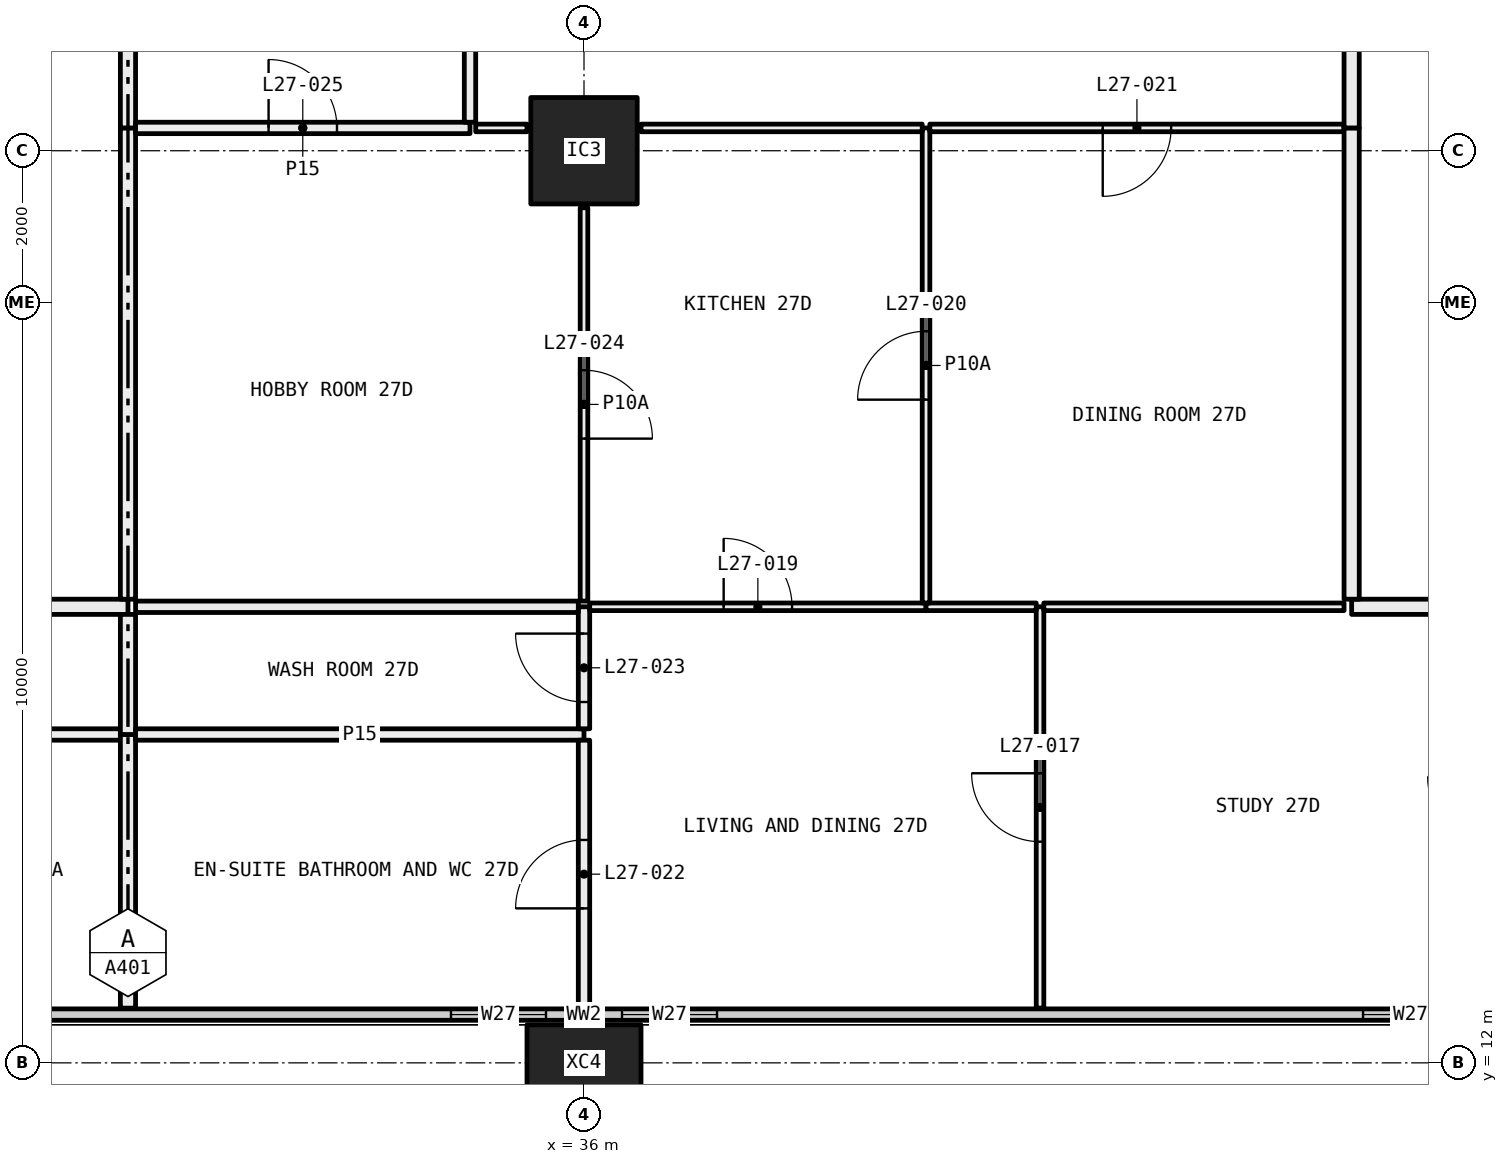
"""IFC4 building model, lengths in metres.
Left out: names, types, materials, properties, quantities, classifications, styles, units other than length and angle.
Written with IfcOpenShell. Run it as: python <this file> out.ifc"""

import sys

from ifc_helpers import new_model, si_unit, direction, frame, frame_2d, origin, origin_2d, place, context, subcontext, project, spatial, rectangle, hollow_rectangle, extrude, element, fill, save


model = new_model("IFC4")
c1 = context("Model", 3, precision=1e-05, world=origin(), true_north=direction((0.0, 1.0)))
c2 = subcontext(c1, "Body", "Model", "MODEL_VIEW")
j1 = project(units=[si_unit("LENGTHUNIT", "METRE"), si_unit("PLANEANGLEUNIT", "RADIAN")], contexts=[c1])
p1 = place(None, origin())
s1 = spatial("IfcSite", under=j1, at=p1, CompositionType="ELEMENT")
p2 = place(p1, origin())
s2 = spatial("IfcBuilding", under=s1, at=p2, CompositionType="ELEMENT")
p3 = place(p2, frame((0.0, 0.0, 106.95)))
s3 = spatial("IfcBuildingStorey", under=s2, at=p3, CompositionType="ELEMENT", Elevation=106.95)
p4 = place(p3, frame((36.0, 12.0, -0.4), z_axis=(0.0, 0.0, 1.0), x_axis=(1.0, 0.0, 0.0)))
e1 = element("IfcColumn", 1, at=p4, inside=s3, PredefinedType="COLUMN", context=c2, shape_type="SweptSolid", body=[
    extrude(hollow_rectangle(XDim=1.5, YDim=1.0, WallThickness=0.06, at=origin_2d()), origin(), (0.0, 0.0, 1.0), 3.45),
])
p5 = place(p3, frame((36.0, 24.0, 0.0), z_axis=(0.0, 0.0, 1.0), x_axis=(1.0, 0.0, 0.0)))
e2 = element("IfcColumn", 2, at=p5, inside=s3, PredefinedType="COLUMN", context=c2, shape_type="SweptSolid", body=[
    extrude(hollow_rectangle(XDim=1.4, YDim=1.4, WallThickness=0.06, at=origin_2d()), origin(), (0.0, 0.0, 1.0), 3.05),
])
p6 = place(p3, frame((6.56, 12.635, 0.0), z_axis=(0.0, 0.0, 1.0), x_axis=(1.0, 0.0, 0.0)))
e3 = element("IfcWall", 3, at=p6, inside=s3, PredefinedType="ELEMENTEDWALL", context=c2, shape_type="SweptSolid", body=[
    extrude(rectangle(XDim=58.88, YDim=0.15, at=frame_2d((29.44, 0.0))), origin(), (0.0, 0.0, 1.0), 3.05),
])
p7 = place(p6, frame((0.44, 0.0, 0.45)))
e4 = element("IfcOpeningElement", 4, at=p7, cuts=e3, PredefinedType="OPENING", context=c2, shape_type="SweptSolid", body=[
    extrude(rectangle(XDim=4.5, YDim=2.55, at=frame_2d((2.25, 1.275))), frame((0.0, 0.085, 0.0), z_axis=(0.0, -1.0, 0.0), x_axis=(1.0, 0.0, 0.0)), (0.0, 0.0, 1.0), 0.17),
])
p8 = place(p6, frame((5.94, 0.0, 0.45)))
e5 = element("IfcOpeningElement", 5, at=p8, cuts=e3, PredefinedType="OPENING", context=c2, shape_type="SweptSolid", body=[
    extrude(rectangle(XDim=1.25, YDim=2.55, at=frame_2d((0.625, 1.275))), frame((0.0, 0.085, 0.0), z_axis=(0.0, -1.0, 0.0), x_axis=(1.0, 0.0, 0.0)), (0.0, 0.0, 1.0), 0.17),
])
p9 = place(p6, frame((15.69, 0.0, 0.45)))
e6 = element("IfcOpeningElement", 6, at=p9, cuts=e3, PredefinedType="OPENING", context=c2, shape_type="SweptSolid", body=[
    extrude(rectangle(XDim=1.25, YDim=2.55, at=frame_2d((0.625, 1.275))), frame((0.0, 0.085, 0.0), z_axis=(0.0, -1.0, 0.0), x_axis=(1.0, 0.0, 0.0)), (0.0, 0.0, 1.0), 0.17),
])
p10 = place(p6, frame((17.94, 0.0, 0.45)))
e7 = element("IfcOpeningElement", 7, at=p10, cuts=e3, PredefinedType="OPENING", context=c2, shape_type="SweptSolid", body=[
    extrude(rectangle(XDim=1.25, YDim=2.55, at=frame_2d((0.625, 1.275))), frame((0.0, 0.085, 0.0), z_axis=(0.0, -1.0, 0.0), x_axis=(1.0, 0.0, 0.0)), (0.0, 0.0, 1.0), 0.17),
])
p11 = place(p6, frame((27.69, 0.0, 0.45)))
e8 = element("IfcOpeningElement", 8, at=p11, cuts=e3, PredefinedType="OPENING", context=c2, shape_type="SweptSolid", body=[
    extrude(rectangle(XDim=1.25, YDim=2.55, at=frame_2d((0.625, 1.275))), frame((0.0, 0.085, 0.0), z_axis=(0.0, -1.0, 0.0), x_axis=(1.0, 0.0, 0.0)), (0.0, 0.0, 1.0), 0.17),
])
p12 = place(p6, frame((29.94, 0.0, 0.45)))
e9 = element("IfcOpeningElement", 9, at=p12, cuts=e3, PredefinedType="OPENING", context=c2, shape_type="SweptSolid", body=[
    extrude(rectangle(XDim=1.25, YDim=2.55, at=frame_2d((0.625, 1.275))), frame((0.0, 0.085, 0.0), z_axis=(0.0, -1.0, 0.0), x_axis=(1.0, 0.0, 0.0)), (0.0, 0.0, 1.0), 0.17),
])
p13 = place(p6, frame((39.69, 0.0, 0.45)))
e10 = element("IfcOpeningElement", 10, at=p13, cuts=e3, PredefinedType="OPENING", context=c2, shape_type="SweptSolid", body=[
    extrude(rectangle(XDim=1.25, YDim=2.55, at=frame_2d((0.625, 1.275))), frame((0.0, 0.085, 0.0), z_axis=(0.0, -1.0, 0.0), x_axis=(1.0, 0.0, 0.0)), (0.0, 0.0, 1.0), 0.17),
])
p14 = place(p6, frame((41.94, 0.0, 0.45)))
e11 = element("IfcOpeningElement", 11, at=p14, cuts=e3, PredefinedType="OPENING", context=c2, shape_type="SweptSolid", body=[
    extrude(rectangle(XDim=1.25, YDim=2.55, at=frame_2d((0.625, 1.275))), frame((0.0, 0.085, 0.0), z_axis=(0.0, -1.0, 0.0), x_axis=(1.0, 0.0, 0.0)), (0.0, 0.0, 1.0), 0.17),
])
p15 = place(p6, frame((51.69, 0.0, 0.45)))
e12 = element("IfcOpeningElement", 12, at=p15, cuts=e3, PredefinedType="OPENING", context=c2, shape_type="SweptSolid", body=[
    extrude(rectangle(XDim=1.25, YDim=2.55, at=frame_2d((0.625, 1.275))), frame((0.0, 0.085, 0.0), z_axis=(0.0, -1.0, 0.0), x_axis=(1.0, 0.0, 0.0)), (0.0, 0.0, 1.0), 0.17),
])
p16 = place(p6, frame((53.94, 0.0, 0.45)))
e13 = element("IfcOpeningElement", 13, at=p16, cuts=e3, PredefinedType="OPENING", context=c2, shape_type="SweptSolid", body=[
    extrude(rectangle(XDim=4.5, YDim=2.55, at=frame_2d((2.25, 1.275))), frame((0.0, 0.085, 0.0), z_axis=(0.0, -1.0, 0.0), x_axis=(1.0, 0.0, 0.0)), (0.0, 0.0, 1.0), 0.17),
])
p17 = place(p3, frame((29.9, 16.32, 0.0), z_axis=(0.0, 0.0, 1.0), x_axis=(-1.0, 0.0, 0.0)))
e14 = element("IfcWall", 14, at=p17, inside=s3, PredefinedType="PARTITIONING", context=c2, shape_type="SweptSolid", body=[
    extrude(rectangle(XDim=5.825, YDim=0.15, at=frame_2d((2.913, 0.0))), origin(), (0.0, 0.0, 1.0), 3.05),
])
p18 = place(p3, frame((30.0, 12.72, 0.0), z_axis=(0.0, 0.0, 1.0), x_axis=(0.0, 1.0, 0.0)))
e15 = element("IfcWall", 15, at=p18, inside=s3, PredefinedType="PARTITIONING", context=c2, shape_type="SweptSolid", body=[
    extrude(rectangle(XDim=3.6, YDim=0.2, at=frame_2d((1.8, 0.0))), origin(), (0.0, 0.0, 1.0), 3.05),
])
p19 = place(p3, frame((30.0, 18.0, 0.0), z_axis=(0.0, 0.0, 1.0), x_axis=(-1.0, 0.0, 0.0)))
e16 = element("IfcWall", 16, at=p19, inside=s3, PredefinedType="PARTITIONING", context=c2, shape_type="SweptSolid", body=[
    extrude(rectangle(XDim=4.1, YDim=0.2, at=frame_2d((2.05, 0.0))), origin(), (0.0, 0.0, 1.0), 3.05),
])
p20 = place(p3, frame((30.0, 16.32, 0.0), z_axis=(0.0, 0.0, 1.0), x_axis=(0.0, 1.0, 0.0)))
e17 = element("IfcWall", 17, at=p20, inside=s3, PredefinedType="PARTITIONING", context=c2, shape_type="SweptSolid", body=[
    extrude(rectangle(XDim=1.58, YDim=0.2, at=frame_2d((0.79, 0.0))), origin(), (0.0, 0.0, 1.0), 3.05),
])
p21 = place(p3, frame((30.0, 18.1, 0.0), z_axis=(0.0, 0.0, 1.0), x_axis=(0.0, 1.0, 0.0)))
e18 = element("IfcWall", 18, at=p21, inside=s3, PredefinedType="PARTITIONING", context=c2, shape_type="SweptSolid", body=[
    extrude(rectangle(XDim=6.2, YDim=0.2, at=frame_2d((3.1, 0.0))), origin(), (0.0, 0.0, 1.0), 2.45),
])
p22 = place(p3, frame((30.0, 24.3, 0.0), z_axis=(0.0, 0.0, 1.0), x_axis=(0.0, 1.0, 0.0)))
e19 = element("IfcWall", 19, at=p22, inside=s3, PredefinedType="PARTITIONING", context=c2, shape_type="SweptSolid", body=[
    extrude(rectangle(XDim=4.5, YDim=0.2, at=frame_2d((2.25, 0.0))), origin(), (0.0, 0.0, 1.0), 3.05),
])
p23 = place(p3, frame((36.0, 16.32, 0.0), z_axis=(0.0, 0.0, 1.0), x_axis=(-1.0, 0.0, 0.0)))
e20 = element("IfcWall", 20, at=p23, inside=s3, PredefinedType="PARTITIONING", context=c2, shape_type="SweptSolid", body=[
    extrude(rectangle(XDim=5.9, YDim=0.15, at=frame_2d((2.95, 0.0))), origin(), (0.0, 0.0, 1.0), 2.45),
])
p24 = place(p3, frame((36.0, 12.72, 0.0), z_axis=(0.0, 0.0, 1.0), x_axis=(0.0, 1.0, 0.0)))
e21 = element("IfcWall", 21, at=p24, inside=s3, PredefinedType="PARTITIONING", context=c2, shape_type="SweptSolid", body=[
    extrude(rectangle(XDim=3.525, YDim=0.15, at=frame_2d((1.763, 0.0))), origin(), (0.0, 0.0, 1.0), 2.45),
])
p25 = place(p24, frame((1.312, 0.0, 0.0)))
e22 = element("IfcOpeningElement", 22, at=p25, cuts=e21, PredefinedType="OPENING", context=c2, shape_type="SweptSolid", body=[
    extrude(rectangle(XDim=0.9, YDim=2.1, at=frame_2d((0.45, 1.05))), frame((0.0, 0.085, 0.0), z_axis=(0.0, -1.0, 0.0), x_axis=(1.0, 0.0, 0.0)), (0.0, 0.0, 1.0), 0.17),
])
p26 = place(p3, frame((36.0, 16.395, 0.0), z_axis=(0.0, 0.0, 1.0), x_axis=(0.0, 1.0, 0.0)))
e23 = element("IfcWall", 23, at=p26, inside=s3, PredefinedType="PARTITIONING", context=c2, shape_type="SweptSolid", body=[
    extrude(rectangle(XDim=1.605, YDim=0.15, at=frame_2d((0.802, 0.0))), origin(), (0.0, 0.0, 1.0), 2.45),
])
p27 = place(p26, frame((0.353, 0.0, 0.0)))
e24 = element("IfcOpeningElement", 24, at=p27, cuts=e23, PredefinedType="OPENING", context=c2, shape_type="SweptSolid", body=[
    extrude(rectangle(XDim=0.9, YDim=2.1, at=frame_2d((0.45, 1.05))), frame((0.0, 0.085, 0.0), z_axis=(0.0, -1.0, 0.0), x_axis=(1.0, 0.0, 0.0)), (0.0, 0.0, 1.0), 0.17),
])
p28 = place(p3, frame((35.925, 18.0, 0.0), z_axis=(0.0, 0.0, 1.0), x_axis=(-1.0, 0.0, 0.0)))
e25 = element("IfcWall", 25, at=p28, inside=s3, PredefinedType="PARTITIONING", context=c2, shape_type="SweptSolid", body=[
    extrude(rectangle(XDim=5.825, YDim=0.15, at=frame_2d((2.913, 0.0))), origin(), (0.0, 0.0, 1.0), 2.45),
])
p29 = place(p3, frame((42.0, 12.72, 0.0), z_axis=(0.0, 0.0, 1.0), x_axis=(0.0, 1.0, 0.0)))
e26 = element("IfcWall", 26, at=p29, inside=s3, PredefinedType="PARTITIONING", context=c2, shape_type="SweptSolid", body=[
    extrude(rectangle(XDim=5.28, YDim=0.1, at=frame_2d((2.64, 0.0))), origin(), (0.0, 0.0, 1.0), 3.05),
])
p30 = place(p29, frame((2.19, 0.0, 0.0)))
e27 = element("IfcOpeningElement", 27, at=p30, cuts=e26, PredefinedType="OPENING", context=c2, shape_type="SweptSolid", body=[
    extrude(rectangle(XDim=0.9, YDim=2.1, at=frame_2d((0.45, 1.05))), frame((0.0, 0.06, 0.0), z_axis=(0.0, -1.0, 0.0), x_axis=(1.0, 0.0, 0.0)), (0.0, 0.0, 1.0), 0.12),
])
p31 = place(p3, frame((40.5, 18.0, 0.0), z_axis=(0.0, 0.0, 1.0), x_axis=(-1.0, 0.0, 0.0)))
e28 = element("IfcWall", 28, at=p31, inside=s3, PredefinedType="PARTITIONING", context=c2, shape_type="SweptSolid", body=[
    extrude(rectangle(XDim=4.425, YDim=0.1, at=frame_2d((2.212, 0.0))), origin(), (0.0, 0.0, 1.0), 2.45),
])
p32 = place(p31, frame((1.762, 0.0, 0.0)))
e29 = element("IfcOpeningElement", 29, at=p32, cuts=e28, PredefinedType="OPENING", context=c2, shape_type="SweptSolid", body=[
    extrude(rectangle(XDim=0.9, YDim=2.1, at=frame_2d((0.45, 1.05))), frame((0.0, 0.06, 0.0), z_axis=(0.0, -1.0, 0.0), x_axis=(1.0, 0.0, 0.0)), (0.0, 0.0, 1.0), 0.12),
])
p33 = place(p3, frame((41.95, 18.0, 0.0), z_axis=(0.0, 0.0, 1.0), x_axis=(-1.0, 0.0, 0.0)))
e30 = element("IfcWall", 30, at=p33, inside=s3, PredefinedType="PARTITIONING", context=c2, shape_type="SweptSolid", body=[
    extrude(rectangle(XDim=1.45, YDim=0.1, at=frame_2d((0.725, 0.0))), origin(), (0.0, 0.0, 1.0), 3.05),
])
p34 = place(p3, frame((46.0, 18.0, 0.0), z_axis=(0.0, 0.0, 1.0), x_axis=(-1.0, 0.0, 0.0)))
e31 = element("IfcWall", 31, at=p34, inside=s3, PredefinedType="PARTITIONING", context=c2, shape_type="SweptSolid", body=[
    extrude(rectangle(XDim=3.95, YDim=0.1, at=frame_2d((1.975, 0.0))), origin(), (0.0, 0.0, 1.0), 3.05),
])
p35 = place(p3, frame((48.0, 18.0, 0.0), z_axis=(0.0, 0.0, 1.0), x_axis=(-1.0, 0.0, 0.0)))
e32 = element("IfcWall", 32, at=p35, inside=s3, PredefinedType="PARTITIONING", context=c2, shape_type="SweptSolid", body=[
    extrude(rectangle(XDim=1.9, YDim=0.2, at=frame_2d((0.95, 0.0))), origin(), (0.0, 0.0, 1.0), 3.05),
])
p36 = place(p3, frame((36.0, 18.075, 0.0), z_axis=(0.0, 0.0, 1.0), x_axis=(0.0, 1.0, 0.0)))
e33 = element("IfcWall", 33, at=p36, inside=s3, PredefinedType="PARTITIONING", context=c2, shape_type="SweptSolid", body=[
    extrude(rectangle(XDim=5.175, YDim=0.1, at=frame_2d((2.587, 0.0))), origin(), (0.0, 0.0, 1.0), 2.45),
])
p37 = place(p36, frame((2.137, 0.0, 0.0)))
e34 = element("IfcOpeningElement", 34, at=p37, cuts=e33, PredefinedType="OPENING", context=c2, shape_type="SweptSolid", body=[
    extrude(rectangle(XDim=0.9, YDim=2.1, at=frame_2d((0.45, 1.05))), frame((0.0, 0.06, 0.0), z_axis=(0.0, -1.0, 0.0), x_axis=(1.0, 0.0, 0.0)), (0.0, 0.0, 1.0), 0.12),
])
p38 = place(p3, frame((34.5, 24.3, 0.0), z_axis=(0.0, 0.0, 1.0), x_axis=(-1.0, 0.0, 0.0)))
e35 = element("IfcWall", 35, at=p38, inside=s3, PredefinedType="PARTITIONING", context=c2, shape_type="SweptSolid", body=[
    extrude(rectangle(XDim=4.4, YDim=0.15, at=frame_2d((2.2, 0.0))), origin(), (0.0, 0.0, 1.0), 3.05),
])
p39 = place(p38, frame((1.75, 0.0, 0.0)))
e36 = element("IfcOpeningElement", 36, at=p39, cuts=e35, PredefinedType="OPENING", context=c2, shape_type="SweptSolid", body=[
    extrude(rectangle(XDim=0.9, YDim=2.1, at=frame_2d((0.45, 1.05))), frame((0.0, 0.085, 0.0), z_axis=(0.0, -1.0, 0.0), x_axis=(1.0, 0.0, 0.0)), (0.0, 0.0, 1.0), 0.17),
])
p40 = place(p3, frame((35.25, 24.3, 0.0), z_axis=(0.0, 0.0, 1.0), x_axis=(-1.0, 0.0, 0.0)))
e37 = element("IfcWall", 37, at=p40, inside=s3, PredefinedType="PARTITIONING", context=c2, shape_type="SweptSolid", body=[
    extrude(rectangle(XDim=0.675, YDim=0.1, at=frame_2d((0.337, 0.0))), origin(), (0.0, 0.0, 1.0), 3.05),
])
p41 = place(p3, frame((40.5, 18.05, 0.0), z_axis=(0.0, 0.0, 1.0), x_axis=(0.0, 1.0, 0.0)))
e38 = element("IfcWall", 38, at=p41, inside=s3, PredefinedType="PARTITIONING", context=c2, shape_type="SweptSolid", body=[
    extrude(rectangle(XDim=6.25, YDim=0.1, at=frame_2d((3.125, 0.0))), origin(), (0.0, 0.0, 1.0), 2.45),
])
p42 = place(p41, frame((2.675, 0.0, 0.0)))
e39 = element("IfcOpeningElement", 39, at=p42, cuts=e38, PredefinedType="OPENING", context=c2, shape_type="SweptSolid", body=[
    extrude(rectangle(XDim=0.9, YDim=2.1, at=frame_2d((0.45, 1.05))), frame((0.0, 0.06, 0.0), z_axis=(0.0, -1.0, 0.0), x_axis=(1.0, 0.0, 0.0)), (0.0, 0.0, 1.0), 0.12),
])
p43 = place(p3, frame((40.45, 24.3, 0.0), z_axis=(0.0, 0.0, 1.0), x_axis=(-1.0, 0.0, 0.0)))
e40 = element("IfcWall", 40, at=p43, inside=s3, PredefinedType="PARTITIONING", context=c2, shape_type="SweptSolid", body=[
    extrude(rectangle(XDim=3.7, YDim=0.1, at=frame_2d((1.85, 0.0))), origin(), (0.0, 0.0, 1.0), 3.05),
])
p44 = place(p3, frame((46.0, 24.3, 0.0), z_axis=(0.0, 0.0, 1.0), x_axis=(-1.0, 0.0, 0.0)))
e41 = element("IfcWall", 41, at=p44, inside=s3, PredefinedType="PARTITIONING", context=c2, shape_type="SweptSolid", body=[
    extrude(rectangle(XDim=5.45, YDim=0.1, at=frame_2d((2.725, 0.0))), origin(), (0.0, 0.0, 1.0), 3.05),
])
p45 = place(p44, frame((2.275, 0.0, 0.0)))
e42 = element("IfcOpeningElement", 42, at=p45, cuts=e41, PredefinedType="OPENING", context=c2, shape_type="SweptSolid", body=[
    extrude(rectangle(XDim=0.9, YDim=2.1, at=frame_2d((0.45, 1.05))), frame((0.0, 0.06, 0.0), z_axis=(0.0, -1.0, 0.0), x_axis=(1.0, 0.0, 0.0)), (0.0, 0.0, 1.0), 0.12),
])
p46 = place(p3, frame((46.1, 18.1, 0.0), z_axis=(0.0, 0.0, 1.0), x_axis=(0.0, 1.0, 0.0)))
e43 = element("IfcWall", 43, at=p46, inside=s3, PredefinedType="PARTITIONING", context=c2, shape_type="SweptSolid", body=[
    extrude(rectangle(XDim=6.2, YDim=0.2, at=frame_2d((3.1, 0.0))), origin(), (0.0, 0.0, 1.0), 2.45),
])
p47 = place(p3, frame((34.5, 24.375, 0.0), z_axis=(0.0, 0.0, 1.0), x_axis=(0.0, 1.0, 0.0)))
e44 = element("IfcWall", 44, at=p47, inside=s3, PredefinedType="PARTITIONING", context=c2, shape_type="SweptSolid", body=[
    extrude(rectangle(XDim=4.325, YDim=0.15, at=frame_2d((2.163, 0.0))), origin(), (0.0, 0.0, 1.0), 3.05),
])
p48 = place(p3, frame((46.1, 24.3, 0.0), z_axis=(0.0, 0.0, 1.0), x_axis=(0.0, 1.0, 0.0)))
e45 = element("IfcWall", 45, at=p48, inside=s3, PredefinedType="PARTITIONING", context=c2, shape_type="SweptSolid", body=[
    extrude(rectangle(XDim=4.5, YDim=0.2, at=frame_2d((2.25, 0.0))), origin(), (0.0, 0.0, 1.0), 3.05),
])
p49 = place(p11, origin())
e46 = element("IfcWindow", 46, at=p49, inside=s3, PartitioningType="SINGLE_PANEL", PredefinedType="WINDOW", context=c2, shape_type="SweptSolid", body=[
    extrude(rectangle(XDim=1.25, YDim=2.55, at=frame_2d((0.625, 1.275))), frame((0.0, 0.03, 0.0), z_axis=(0.0, -1.0, 0.0), x_axis=(1.0, 0.0, 0.0)), (0.0, 0.0, 1.0), 0.06),
])
fill(e8, e46)
p50 = place(p12, origin())
e47 = element("IfcWindow", 47, at=p50, inside=s3, PartitioningType="SINGLE_PANEL", PredefinedType="WINDOW", context=c2, shape_type="SweptSolid", body=[
    extrude(rectangle(XDim=1.25, YDim=2.55, at=frame_2d((0.625, 1.275))), frame((0.0, 0.03, 0.0), z_axis=(0.0, -1.0, 0.0), x_axis=(1.0, 0.0, 0.0)), (0.0, 0.0, 1.0), 0.06),
])
fill(e9, e47)
p51 = place(p13, origin())
e48 = element("IfcWindow", 48, at=p51, inside=s3, PartitioningType="SINGLE_PANEL", PredefinedType="WINDOW", context=c2, shape_type="SweptSolid", body=[
    extrude(rectangle(XDim=1.25, YDim=2.55, at=frame_2d((0.625, 1.275))), frame((0.0, 0.03, 0.0), z_axis=(0.0, -1.0, 0.0), x_axis=(1.0, 0.0, 0.0)), (0.0, 0.0, 1.0), 0.06),
])
fill(e10, e48)
p52 = place(p30, origin())
e49 = element("IfcDoor", 49, at=p52, inside=s3, OperationType="SINGLE_SWING_LEFT", PredefinedType="DOOR", context=c2, shape_type="SweptSolid", body=[
    extrude(rectangle(XDim=0.9, YDim=2.1, at=frame_2d((0.45, 1.05))), frame((0.0, 0.025, 0.0), z_axis=(0.0, -1.0, 0.0), x_axis=(1.0, 0.0, 0.0)), (0.0, 0.0, 1.0), 0.05),
])
fill(e27, e49)
p53 = place(p32, frame((0.9, 0.0, 0.0), x_axis=(-1.0, 0.0, 0.0)))
e50 = element("IfcDoor", 50, at=p53, inside=s3, OperationType="SINGLE_SWING_RIGHT", PredefinedType="DOOR", context=c2, shape_type="SweptSolid", body=[
    extrude(rectangle(XDim=0.9, YDim=2.1, at=frame_2d((0.45, 1.05))), frame((0.0, 0.025, 0.0), z_axis=(0.0, -1.0, 0.0), x_axis=(1.0, 0.0, 0.0)), (0.0, 0.0, 1.0), 0.05),
])
fill(e29, e50)
p54 = place(p42, origin())
e51 = element("IfcDoor", 51, at=p54, inside=s3, OperationType="SINGLE_SWING_RIGHT", PredefinedType="DOOR", context=c2, shape_type="SweptSolid", body=[
    extrude(rectangle(XDim=0.9, YDim=2.1, at=frame_2d((0.45, 1.05))), frame((0.0, 0.025, 0.0), z_axis=(0.0, -1.0, 0.0), x_axis=(1.0, 0.0, 0.0)), (0.0, 0.0, 1.0), 0.05),
])
fill(e39, e51)
p55 = place(p45, origin())
e52 = element("IfcDoor", 52, at=p55, inside=s3, OperationType="SINGLE_SWING_LEFT", PredefinedType="DOOR", context=c2, shape_type="SweptSolid", body=[
    extrude(rectangle(XDim=0.9, YDim=2.1, at=frame_2d((0.45, 1.05))), frame((0.0, 0.025, 0.0), z_axis=(0.0, -1.0, 0.0), x_axis=(1.0, 0.0, 0.0)), (0.0, 0.0, 1.0), 0.05),
])
fill(e42, e52)
p56 = place(p25, origin())
e53 = element("IfcDoor", 53, at=p56, inside=s3, OperationType="SINGLE_SWING_RIGHT", PredefinedType="DOOR", context=c2, shape_type="SweptSolid", body=[
    extrude(rectangle(XDim=0.9, YDim=2.1, at=frame_2d((0.45, 1.05))), frame((0.0, 0.025, 0.0), z_axis=(0.0, -1.0, 0.0), x_axis=(1.0, 0.0, 0.0)), (0.0, 0.0, 1.0), 0.05),
])
fill(e22, e53)
p57 = place(p27, origin())
e54 = element("IfcDoor", 54, at=p57, inside=s3, OperationType="SINGLE_SWING_LEFT", PredefinedType="DOOR", context=c2, shape_type="SweptSolid", body=[
    extrude(rectangle(XDim=0.9, YDim=2.1, at=frame_2d((0.45, 1.05))), frame((0.0, 0.025, 0.0), z_axis=(0.0, -1.0, 0.0), x_axis=(1.0, 0.0, 0.0)), (0.0, 0.0, 1.0), 0.05),
])
fill(e24, e54)
p58 = place(p37, frame((0.9, 0.0, 0.0), x_axis=(-1.0, 0.0, 0.0)))
e55 = element("IfcDoor", 55, at=p58, inside=s3, OperationType="SINGLE_SWING_LEFT", PredefinedType="DOOR", context=c2, shape_type="SweptSolid", body=[
    extrude(rectangle(XDim=0.9, YDim=2.1, at=frame_2d((0.45, 1.05))), frame((0.0, 0.025, 0.0), z_axis=(0.0, -1.0, 0.0), x_axis=(1.0, 0.0, 0.0)), (0.0, 0.0, 1.0), 0.05),
])
fill(e34, e55)
p59 = place(p39, frame((0.9, 0.0, 0.0), x_axis=(-1.0, 0.0, 0.0)))
e56 = element("IfcDoor", 56, at=p59, inside=s3, OperationType="SINGLE_SWING_RIGHT", PredefinedType="DOOR", context=c2, shape_type="SweptSolid", body=[
    extrude(rectangle(XDim=0.9, YDim=2.1, at=frame_2d((0.45, 1.05))), frame((0.0, 0.025, 0.0), z_axis=(0.0, -1.0, 0.0), x_axis=(1.0, 0.0, 0.0)), (0.0, 0.0, 1.0), 0.05),
])
fill(e36, e56)
save(model, sys.argv[1])
